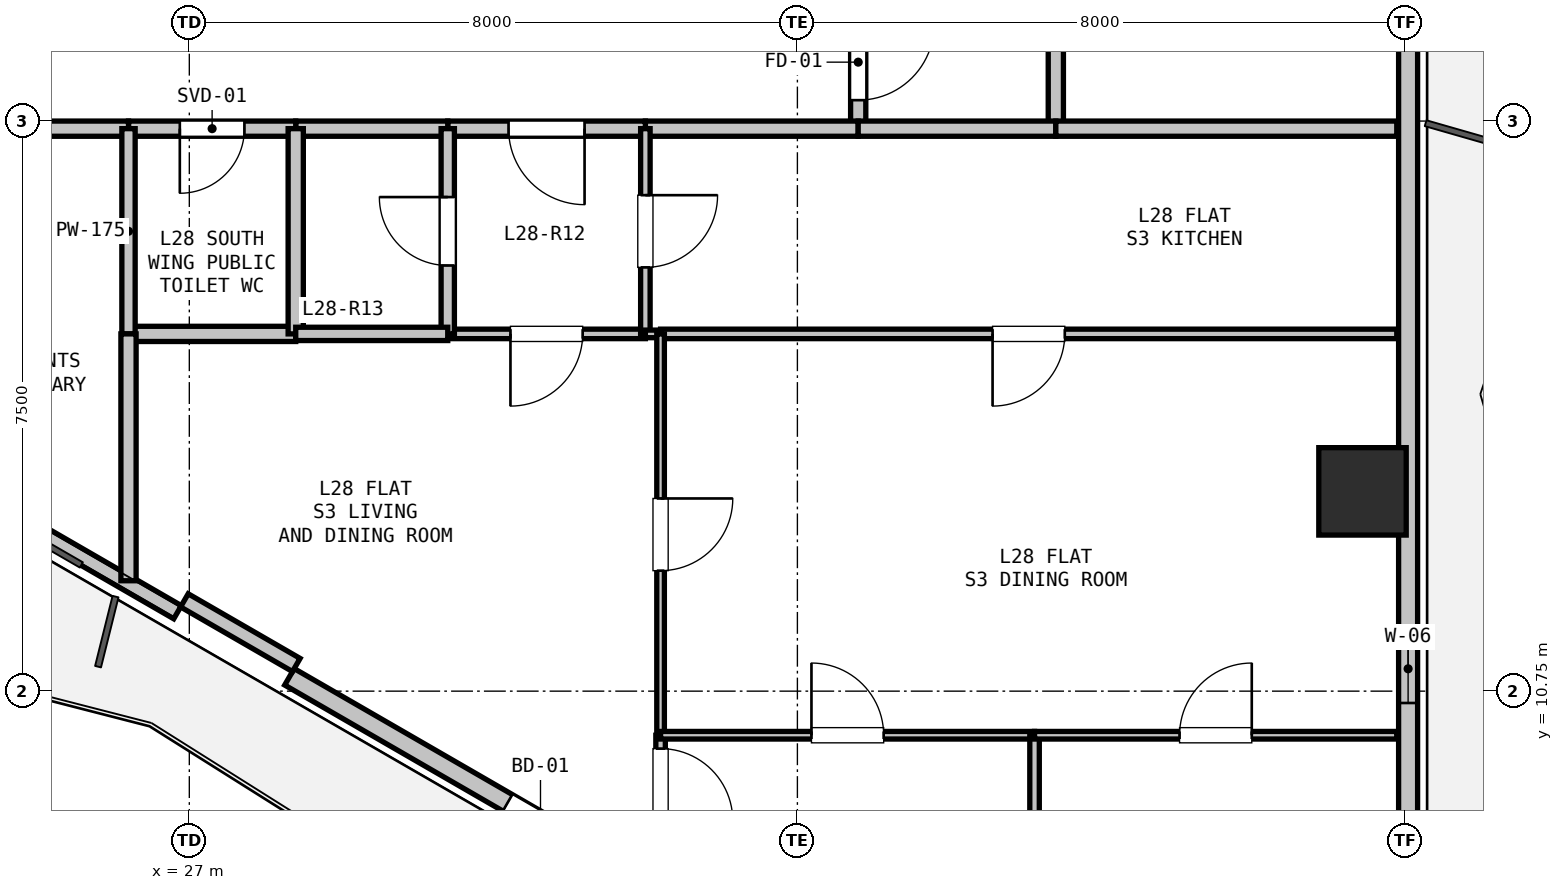
"""IFC4 building model, lengths in metres.
Left out: names, types, materials, properties, quantities, classifications, styles, units other than length and angle.
Written with IfcOpenShell. Run it as: python <this file> out.ifc"""

import sys

from ifc_helpers import new_model, si_unit, direction, frame, frame_2d, origin, origin_2d, place, context, subcontext, project, spatial, rectangle, hollow_rectangle, extrude, element, fill, save


model = new_model("IFC4")
c1 = context("Model", 3, precision=1e-05, world=origin(), true_north=direction((0.0, 1.0)))
c2 = subcontext(c1, "Body", "Model", "MODEL_VIEW")
j1 = project(units=[si_unit("LENGTHUNIT", "METRE"), si_unit("PLANEANGLEUNIT", "RADIAN")], contexts=[c1])
p1 = place(None, origin())
s1 = spatial("IfcSite", under=j1, at=p1, CompositionType="ELEMENT")
p2 = place(p1, origin())
s2 = spatial("IfcBuilding", under=s1, at=p2, CompositionType="ELEMENT")
p3 = place(p2, frame((0.0, 0.0, 103.2)))
s3 = spatial("IfcBuildingStorey", under=s2, at=p3, CompositionType="ELEMENT", Elevation=103.2)
p4 = place(p3, frame((42.435, 13.378, 0.0), z_axis=(0.0, 0.0, 1.0), x_axis=(1.0, 0.0, 0.0)))
e1 = element("IfcColumn", 1, at=p4, inside=s3, PredefinedType="COLUMN", context=c2, shape_type="SweptSolid", body=[
    extrude(hollow_rectangle(XDim=1.15, YDim=1.15, WallThickness=0.032, at=origin_2d()), origin(), (0.0, 0.0, 1.0), 3.3),
])
p5 = place(p3, frame((43.035, 19.435, 0.0), z_axis=(0.0, 0.0, 1.0), x_axis=(0.0, -1.0, 0.0)))
e2 = element("IfcWall", 2, at=p5, inside=s3, PredefinedType="SOLIDWALL", context=c2, shape_type="SweptSolid", body=[
    extrude(rectangle(XDim=11.93, YDim=0.25, at=frame_2d((5.965, 0.0))), origin(), (0.0, 0.0, 1.0), 2.67),
])
p6 = place(p5, frame((7.941, 0.0, 0.9)))
e3 = element("IfcOpeningElement", 3, at=p6, cuts=e2, PredefinedType="OPENING", context=c2, shape_type="SweptSolid", body=[
    extrude(rectangle(XDim=0.9, YDim=1.4, at=frame_2d((0.45, 0.7))), frame((0.0, 0.135, 0.0), z_axis=(0.0, -1.0, 0.0), x_axis=(1.0, 0.0, 0.0)), (0.0, 0.0, 1.0), 0.27),
])
p7 = place(p3, frame((38.649, 4.973, 0.0), z_axis=(0.0, 0.0, 1.0), x_axis=(-0.866023023012, 0.500004123596, 0.0)))
e4 = element("IfcWall", 4, at=p7, inside=s3, PredefinedType="SOLIDWALL", context=c2, shape_type="SweptSolid", body=[
    extrude(rectangle(XDim=11.93, YDim=0.25, at=frame_2d((5.965, 0.0))), origin(), (0.0, 0.0, 1.0), 2.67),
])
p8 = place(p7, frame((7.616, 0.0, 0.0)))
e5 = element("IfcOpeningElement", 5, at=p8, cuts=e4, PredefinedType="OPENING", context=c2, shape_type="SweptSolid", body=[
    extrude(rectangle(XDim=1.0, YDim=2.1, at=frame_2d((0.5, 1.05))), frame((0.0, 0.135, 0.0), z_axis=(0.0, -1.0, 0.0), x_axis=(1.0, 0.0, 0.0)), (0.0, 0.0, 1.0), 0.27),
])
p9 = place(p7, frame((3.059, 0.0, 0.9)))
e6 = element("IfcOpeningElement", 6, at=p9, cuts=e4, PredefinedType="OPENING", context=c2, shape_type="SweptSolid", body=[
    extrude(rectangle(XDim=1.2, YDim=1.4, at=frame_2d((0.6, 0.7))), frame((0.0, 0.135, 0.0), z_axis=(0.0, -1.0, 0.0), x_axis=(1.0, 0.0, 0.0)), (0.0, 0.0, 1.0), 0.27),
])
p10 = place(p3, frame((26.845, 11.788, 0.0), z_axis=(0.0, 0.0, 1.0), x_axis=(-0.866027010039, 0.499997217876, 0.0)))
e7 = element("IfcWall", 7, at=p10, inside=s3, PredefinedType="PARAPET", context=c2, shape_type="SweptSolid", body=[
    extrude(rectangle(XDim=11.229, YDim=0.2, at=frame_2d((5.615, 0.0))), origin(), (0.0, 0.0, 1.0), 0.2),
])
p11 = place(p3, frame((28.407, 11.094, 0.0), z_axis=(0.0, 0.0, 1.0), x_axis=(-0.86605165483, 0.499954529098, 0.0)))
e8 = element("IfcWall", 8, at=p11, inside=s3, PredefinedType="PARAPET", context=c2, shape_type="SweptSolid", body=[
    extrude(rectangle(XDim=1.7, YDim=0.2, at=frame_2d((0.85, 0.0))), origin(), (0.0, 0.0, 1.0), 2.67),
])
p12 = place(p3, frame((35.8, 19.9, 0.0), z_axis=(0.0, 0.0, 1.0), x_axis=(0.0, -1.0, 0.0)))
e9 = element("IfcWall", 9, at=p12, inside=s3, PredefinedType="PARTITIONING", context=c2, shape_type="SweptSolid", body=[
    extrude(rectangle(XDim=1.75, YDim=0.2, at=frame_2d((0.875, 0.0))), origin(), (0.0, 0.0, 1.0), 3.05),
])
p13 = place(p12, frame((0.375, 0.0, 0.0)))
e10 = element("IfcOpeningElement", 10, at=p13, cuts=e9, PredefinedType="OPENING", context=c2, shape_type="SweptSolid", body=[
    extrude(rectangle(XDim=1.0, YDim=2.15, at=frame_2d((0.5, 1.075))), frame((0.0, 0.11, 0.0), z_axis=(0.0, -1.0, 0.0), x_axis=(1.0, 0.0, 0.0)), (0.0, 0.0, 1.0), 0.22),
])
p14 = place(p3, frame((35.8, 18.15, 0.0), z_axis=(0.0, 0.0, 1.0), x_axis=(-1.0, 0.0, 0.0)))
e11 = element("IfcWall", 11, at=p14, inside=s3, PredefinedType="PARTITIONING", context=c2, shape_type="SweptSolid", body=[
    extrude(rectangle(XDim=2.8, YDim=0.2, at=frame_2d((1.4, 0.0))), origin(), (0.0, 0.0, 1.0), 3.05),
])
p15 = place(p3, frame((33.0, 18.15, 0.0), z_axis=(0.0, 0.0, 1.0), x_axis=(-1.0, 0.0, 0.0)))
e12 = element("IfcWall", 12, at=p15, inside=s3, PredefinedType="PARTITIONING", context=c2, shape_type="SweptSolid", body=[
    extrude(rectangle(XDim=2.6, YDim=0.2, at=frame_2d((1.3, 0.0))), origin(), (0.0, 0.0, 1.0), 3.05),
])
p16 = place(p15, frame((0.8, 0.0, 0.0)))
e13 = element("IfcOpeningElement", 13, at=p16, cuts=e12, PredefinedType="OPENING", context=c2, shape_type="SweptSolid", body=[
    extrude(rectangle(XDim=1.0, YDim=2.15, at=frame_2d((0.5, 1.075))), frame((0.0, 0.11, 0.0), z_axis=(0.0, -1.0, 0.0), x_axis=(1.0, 0.0, 0.0)), (0.0, 0.0, 1.0), 0.22),
])
p17 = place(p3, frame((30.4, 18.15, 0.0), z_axis=(0.0, 0.0, 1.0), x_axis=(-1.0, 0.0, 0.0)))
e14 = element("IfcWall", 14, at=p17, inside=s3, PredefinedType="PARTITIONING", context=c2, shape_type="SweptSolid", body=[
    extrude(rectangle(XDim=2.0, YDim=0.2, at=frame_2d((1.0, 0.0))), origin(), (0.0, 0.0, 1.0), 3.05),
])
p18 = place(p3, frame((28.4, 18.15, 0.0), z_axis=(0.0, 0.0, 1.0), x_axis=(-1.0, 0.0, 0.0)))
e15 = element("IfcWall", 15, at=p18, inside=s3, PredefinedType="PARTITIONING", context=c2, shape_type="SweptSolid", body=[
    extrude(rectangle(XDim=2.2, YDim=0.2, at=frame_2d((1.1, 0.0))), origin(), (0.0, 0.0, 1.0), 3.05),
])
p19 = place(p18, frame((0.675, 0.0, 0.0)))
e16 = element("IfcOpeningElement", 16, at=p19, cuts=e15, PredefinedType="OPENING", context=c2, shape_type="SweptSolid", body=[
    extrude(rectangle(XDim=0.85, YDim=2.1, at=frame_2d((0.425, 1.05))), frame((0.0, 0.11, 0.0), z_axis=(0.0, -1.0, 0.0), x_axis=(1.0, 0.0, 0.0)), (0.0, 0.0, 1.0), 0.22),
])
p20 = place(p3, frame((26.2, 18.15, 0.0), z_axis=(0.0, 0.0, 1.0), x_axis=(-1.0, 0.0, 0.0)))
e17 = element("IfcWall", 17, at=p20, inside=s3, PredefinedType="PARTITIONING", context=c2, shape_type="SweptSolid", body=[
    extrude(rectangle(XDim=6.6, YDim=0.2, at=frame_2d((3.3, 0.0))), origin(), (0.0, 0.0, 1.0), 2.423),
])
p21 = place(p20, frame((2.4, 0.0, 0.0)))
e18 = element("IfcOpeningElement", 18, at=p21, cuts=e17, PredefinedType="OPENING", context=c2, shape_type="SweptSolid", body=[
    extrude(rectangle(XDim=1.8, YDim=2.2, at=frame_2d((0.9, 1.1))), frame((0.0, 0.11, 0.0), z_axis=(0.0, -1.0, 0.0), x_axis=(1.0, 0.0, 0.0)), (0.0, 0.0, 1.0), 0.22),
])
p22 = place(p3, frame((38.4, 21.4, 0.0), z_axis=(0.0, 0.0, 1.0), x_axis=(0.0, -1.0, 0.0)))
e19 = element("IfcWall", 19, at=p22, inside=s3, PredefinedType="PARTITIONING", context=c2, shape_type="SweptSolid", body=[
    extrude(rectangle(XDim=3.25, YDim=0.2, at=frame_2d((1.625, 0.0))), origin(), (0.0, 0.0, 1.0), 3.05),
])
p23 = place(p3, frame((38.4, 18.15, 0.0), z_axis=(0.0, 0.0, 1.0), x_axis=(-1.0, 0.0, 0.0)))
e20 = element("IfcWall", 20, at=p23, inside=s3, PredefinedType="PARTITIONING", context=c2, shape_type="SweptSolid", body=[
    extrude(rectangle(XDim=2.6, YDim=0.2, at=frame_2d((1.3, 0.0))), origin(), (0.0, 0.0, 1.0), 2.423),
])
p24 = place(p3, frame((33.0, 15.45, 0.0), z_axis=(0.0, 0.0, 1.0), x_axis=(-1.0, 0.0, 0.0)))
e21 = element("IfcWall", 21, at=p24, inside=s3, PredefinedType="PARTITIONING", context=c2, shape_type="SweptSolid", body=[
    extrude(rectangle(XDim=2.6, YDim=0.125, at=frame_2d((1.3, 0.0))), origin(), (0.0, 0.0, 1.0), 3.05),
])
p25 = place(p24, frame((0.825, 0.0, 0.0)))
e22 = element("IfcOpeningElement", 22, at=p25, cuts=e21, PredefinedType="OPENING", context=c2, shape_type="SweptSolid", body=[
    extrude(rectangle(XDim=0.95, YDim=2.1, at=frame_2d((0.475, 1.05))), frame((0.0, 0.073, 0.0), z_axis=(0.0, -1.0, 0.0), x_axis=(1.0, 0.0, 0.0)), (0.0, 0.0, 1.0), 0.145),
])
p26 = place(p3, frame((30.4, 15.45, 0.0), z_axis=(0.0, 0.0, 1.0), x_axis=(0.0, 1.0, 0.0)))
e23 = element("IfcWall", 23, at=p26, inside=s3, PredefinedType="PLUMBINGWALL", context=c2, shape_type="SweptSolid", body=[
    extrude(rectangle(XDim=2.7, YDim=0.175, at=frame_2d((1.35, 0.0))), origin(), (0.0, 0.0, 1.0), 3.05),
])
p27 = place(p26, frame((0.9, 0.0, 0.0)))
e24 = element("IfcOpeningElement", 24, at=p27, cuts=e23, PredefinedType="OPENING", context=c2, shape_type="SweptSolid", body=[
    extrude(rectangle(XDim=0.9, YDim=2.1, at=frame_2d((0.45, 1.05))), frame((0.0, 0.097, 0.0), z_axis=(0.0, -1.0, 0.0), x_axis=(1.0, 0.0, 0.0)), (0.0, 0.0, 1.0), 0.195),
])
p28 = place(p3, frame((33.0, 18.15, 0.0), z_axis=(0.0, 0.0, 1.0), x_axis=(0.0, -1.0, 0.0)))
e25 = element("IfcWall", 25, at=p28, inside=s3, PredefinedType="PARTITIONING", context=c2, shape_type="SweptSolid", body=[
    extrude(rectangle(XDim=2.7, YDim=0.125, at=frame_2d((1.35, 0.0))), origin(), (0.0, 0.0, 1.0), 3.05),
])
p29 = place(p28, frame((0.875, 0.0, 0.0)))
e26 = element("IfcOpeningElement", 26, at=p29, cuts=e25, PredefinedType="OPENING", context=c2, shape_type="SweptSolid", body=[
    extrude(rectangle(XDim=0.95, YDim=2.1, at=frame_2d((0.475, 1.05))), frame((0.0, 0.073, 0.0), z_axis=(0.0, -1.0, 0.0), x_axis=(1.0, 0.0, 0.0)), (0.0, 0.0, 1.0), 0.145),
])
p30 = place(p3, frame((28.4, 15.45, 0.0), z_axis=(0.0, 0.0, 1.0), x_axis=(-1.0, 0.0, 0.0)))
e27 = element("IfcWall", 27, at=p30, inside=s3, PredefinedType="PARTITIONING", context=c2, shape_type="SweptSolid", body=[
    extrude(rectangle(XDim=2.2, YDim=0.2, at=frame_2d((1.1, 0.0))), origin(), (0.0, 0.0, 1.0), 2.423),
])
p31 = place(p3, frame((26.2, 15.45, 0.0), z_axis=(0.0, 0.0, 1.0), x_axis=(0.0, 1.0, 0.0)))
e28 = element("IfcWall", 28, at=p31, inside=s3, PredefinedType="PLUMBINGWALL", context=c2, shape_type="SweptSolid", body=[
    extrude(rectangle(XDim=2.7, YDim=0.175, at=frame_2d((1.35, 0.0))), origin(), (0.0, 0.0, 1.0), 2.423),
])
p32 = place(p3, frame((28.4, 18.15, 0.0), z_axis=(0.0, 0.0, 1.0), x_axis=(0.0, -1.0, 0.0)))
e29 = element("IfcWall", 29, at=p32, inside=s3, PredefinedType="PARTITIONING", context=c2, shape_type="SweptSolid", body=[
    extrude(rectangle(XDim=2.7, YDim=0.2, at=frame_2d((1.35, 0.0))), origin(), (0.0, 0.0, 1.0), 3.05),
])
p33 = place(p3, frame((30.4, 15.45, 0.0), z_axis=(0.0, 0.0, 1.0), x_axis=(-1.0, 0.0, 0.0)))
e30 = element("IfcWall", 30, at=p33, inside=s3, PredefinedType="PLUMBINGWALL", context=c2, shape_type="SweptSolid", body=[
    extrude(rectangle(XDim=2.0, YDim=0.175, at=frame_2d((1.0, 0.0))), origin(), (0.0, 0.0, 1.0), 3.05),
])
p34 = place(p3, frame((38.4, 18.15, 0.0), z_axis=(0.0, 0.0, 1.0), x_axis=(1.0, 0.0, 0.0)))
e31 = element("IfcWall", 31, at=p34, inside=s3, PredefinedType="PARTITIONING", context=c2, shape_type="SweptSolid", body=[
    extrude(rectangle(XDim=4.486, YDim=0.2, at=frame_2d((2.243, 0.0))), origin(), (0.0, 0.0, 1.0), 2.365),
])
p35 = place(p3, frame((42.885, 15.45, 0.0), z_axis=(0.0, 0.0, 1.0), x_axis=(-1.0, 0.0, 0.0)))
e32 = element("IfcWall", 32, at=p35, inside=s3, PredefinedType="PARTITIONING", context=c2, shape_type="SweptSolid", body=[
    extrude(rectangle(XDim=9.686, YDim=0.125, at=frame_2d((4.843, 0.0))), origin(), (0.0, 0.0, 1.0), 2.365),
])
p36 = place(p35, frame((4.368, 0.0, 0.0)))
e33 = element("IfcOpeningElement", 33, at=p36, cuts=e32, PredefinedType="OPENING", context=c2, shape_type="SweptSolid", body=[
    extrude(rectangle(XDim=0.95, YDim=2.1, at=frame_2d((0.475, 1.05))), frame((0.0, 0.073, 0.0), z_axis=(0.0, -1.0, 0.0), x_axis=(1.0, 0.0, 0.0)), (0.0, 0.0, 1.0), 0.145),
])
p37 = place(p3, frame((33.2, 15.45, 0.0), z_axis=(0.0, 0.0, 1.0), x_axis=(-1.0, 0.0, 0.0)))
e34 = element("IfcWall", 34, at=p37, inside=s3, PredefinedType="PARTITIONING", context=c2, shape_type="SweptSolid", body=[
    extrude(rectangle(XDim=0.2, YDim=0.1, at=frame_2d((0.1, 0.0))), origin(), (0.0, 0.0, 1.0), 3.05),
])
p38 = place(p3, frame((26.2, 15.45, 0.0), z_axis=(0.0, 0.0, 1.0), x_axis=(0.0, -1.0, 0.0)))
e35 = element("IfcWall", 35, at=p38, inside=s3, PredefinedType="PARTITIONING", context=c2, shape_type="SweptSolid", body=[
    extrude(rectangle(XDim=3.248, YDim=0.2, at=frame_2d((1.624, 0.0))), origin(), (0.0, 0.0, 1.0), 2.365),
])
p39 = place(p3, frame((33.2, 15.45, 0.0), z_axis=(0.0, 0.0, 1.0), x_axis=(0.0, -1.0, 0.0)))
e36 = element("IfcWall", 36, at=p39, inside=s3, PredefinedType="PARTITIONING", context=c2, shape_type="SweptSolid", body=[
    extrude(rectangle(XDim=5.28, YDim=0.1, at=frame_2d((2.64, 0.0))), origin(), (0.0, 0.0, 1.0), 3.05),
])
p40 = place(p39, frame((2.165, 0.0, 0.0)))
e37 = element("IfcOpeningElement", 37, at=p40, cuts=e36, PredefinedType="OPENING", context=c2, shape_type="SweptSolid", body=[
    extrude(rectangle(XDim=0.95, YDim=2.1, at=frame_2d((0.475, 1.05))), frame((0.0, 0.06, 0.0), z_axis=(0.0, -1.0, 0.0), x_axis=(1.0, 0.0, 0.0)), (0.0, 0.0, 1.0), 0.12),
])
p41 = place(p3, frame((33.2, 10.17, 0.0), z_axis=(0.0, 0.0, 1.0), x_axis=(0.0, -1.0, 0.0)))
e38 = element("IfcWall", 38, at=p41, inside=s3, PredefinedType="PARTITIONING", context=c2, shape_type="SweptSolid", body=[
    extrude(rectangle(XDim=1.878, YDim=0.125, at=frame_2d((0.939, 0.0))), origin(), (0.0, 0.0, 1.0), 2.365),
])
p42 = place(p41, frame((0.176, 0.0, 0.0)))
e39 = element("IfcOpeningElement", 39, at=p42, cuts=e38, PredefinedType="OPENING", context=c2, shape_type="SweptSolid", body=[
    extrude(rectangle(XDim=0.95, YDim=2.1, at=frame_2d((0.475, 1.05))), frame((0.0, 0.073, 0.0), z_axis=(0.0, -1.0, 0.0), x_axis=(1.0, 0.0, 0.0)), (0.0, 0.0, 1.0), 0.145),
])
p43 = place(p3, frame((33.2, 10.17, 0.0), z_axis=(0.0, 0.0, 1.0), x_axis=(1.0, 0.0, 0.0)))
e40 = element("IfcWall", 40, at=p43, inside=s3, PredefinedType="PARTITIONING", context=c2, shape_type="SweptSolid", body=[
    extrude(rectangle(XDim=4.92, YDim=0.1, at=frame_2d((2.46, 0.0))), origin(), (0.0, 0.0, 1.0), 3.05),
])
p44 = place(p43, frame((1.985, 0.0, 0.0)))
e41 = element("IfcOpeningElement", 41, at=p44, cuts=e40, PredefinedType="OPENING", context=c2, shape_type="SweptSolid", body=[
    extrude(rectangle(XDim=0.95, YDim=2.1, at=frame_2d((0.475, 1.05))), frame((0.0, 0.06, 0.0), z_axis=(0.0, -1.0, 0.0), x_axis=(1.0, 0.0, 0.0)), (0.0, 0.0, 1.0), 0.12),
])
p45 = place(p3, frame((38.12, 10.17, 0.0), z_axis=(0.0, 0.0, 1.0), x_axis=(0.0, -1.0, 0.0)))
e42 = element("IfcWall", 42, at=p45, inside=s3, PredefinedType="PARTITIONING", context=c2, shape_type="SweptSolid", body=[
    extrude(rectangle(XDim=4.719, YDim=0.125, at=frame_2d((2.359, 0.0))), origin(), (0.0, 0.0, 1.0), 2.715),
])
p46 = place(p45, frame((1.885, 0.0, 0.0)))
e43 = element("IfcOpeningElement", 43, at=p46, cuts=e42, PredefinedType="OPENING", context=c2, shape_type="SweptSolid", body=[
    extrude(rectangle(XDim=0.95, YDim=2.1, at=frame_2d((0.475, 1.05))), frame((0.0, 0.073, 0.0), z_axis=(0.0, -1.0, 0.0), x_axis=(1.0, 0.0, 0.0)), (0.0, 0.0, 1.0), 0.145),
])
p47 = place(p3, frame((38.12, 10.17, 0.0), z_axis=(0.0, 0.0, 1.0), x_axis=(1.0, 0.0, 0.0)))
e44 = element("IfcWall", 44, at=p47, inside=s3, PredefinedType="PARTITIONING", context=c2, shape_type="SweptSolid", body=[
    extrude(rectangle(XDim=4.765, YDim=0.1, at=frame_2d((2.383, 0.0))), origin(), (0.0, 0.0, 1.0), 2.423),
])
p48 = place(p47, frame((1.908, 0.0, 0.0)))
e45 = element("IfcOpeningElement", 45, at=p48, cuts=e44, PredefinedType="OPENING", context=c2, shape_type="SweptSolid", body=[
    extrude(rectangle(XDim=0.95, YDim=2.1, at=frame_2d((0.475, 1.05))), frame((0.0, 0.06, 0.0), z_axis=(0.0, -1.0, 0.0), x_axis=(1.0, 0.0, 0.0)), (0.0, 0.0, 1.0), 0.12),
])
p49 = place(p6, origin())
e46 = element("IfcWindow", 46, at=p49, inside=s3, PartitioningType="SINGLE_PANEL", PredefinedType="WINDOW", context=c2, shape_type="SweptSolid", body=[
    extrude(rectangle(XDim=0.9, YDim=1.4, at=frame_2d((0.45, 0.7))), frame((0.0, 0.03, 0.0), z_axis=(0.0, -1.0, 0.0), x_axis=(1.0, 0.0, 0.0)), (0.0, 0.0, 1.0), 0.06),
])
fill(e3, e46)
p50 = place(p8, origin())
e47 = element("IfcDoor", 47, at=p50, inside=s3, OperationType="SINGLE_SWING_LEFT", PredefinedType="DOOR", context=c2, shape_type="SweptSolid", body=[
    extrude(rectangle(XDim=1.0, YDim=2.1, at=frame_2d((0.5, 1.05))), frame((0.0, 0.025, 0.0), z_axis=(0.0, -1.0, 0.0), x_axis=(1.0, 0.0, 0.0)), (0.0, 0.0, 1.0), 0.05),
])
fill(e5, e47)
p51 = place(p13, origin())
e48 = element("IfcDoor", 48, at=p51, inside=s3, OperationType="SINGLE_SWING_LEFT", PredefinedType="DOOR", context=c2, shape_type="SweptSolid", body=[
    extrude(rectangle(XDim=1.0, YDim=2.15, at=frame_2d((0.5, 1.075))), frame((0.0, 0.025, 0.0), z_axis=(0.0, -1.0, 0.0), x_axis=(1.0, 0.0, 0.0)), (0.0, 0.0, 1.0), 0.05),
])
fill(e10, e48)
p52 = place(p16, origin())
e49 = element("IfcDoor", 49, at=p52, inside=s3, OperationType="SINGLE_SWING_LEFT", PredefinedType="DOOR", context=c2, shape_type="SweptSolid", body=[
    extrude(rectangle(XDim=1.0, YDim=2.15, at=frame_2d((0.5, 1.075))), frame((0.0, 0.025, 0.0), z_axis=(0.0, -1.0, 0.0), x_axis=(1.0, 0.0, 0.0)), (0.0, 0.0, 1.0), 0.05),
])
fill(e13, e49)
p53 = place(p19, origin())
e50 = element("IfcDoor", 50, at=p53, inside=s3, OperationType="SINGLE_SWING_RIGHT", PredefinedType="DOOR", context=c2, shape_type="SweptSolid", body=[
    extrude(rectangle(XDim=0.85, YDim=2.1, at=frame_2d((0.425, 1.05))), frame((0.0, 0.025, 0.0), z_axis=(0.0, -1.0, 0.0), x_axis=(1.0, 0.0, 0.0)), (0.0, 0.0, 1.0), 0.05),
])
fill(e16, e50)
p54 = place(p27, origin())
e51 = element("IfcDoor", 51, at=p54, inside=s3, OperationType="SINGLE_SWING_RIGHT", PredefinedType="DOOR", context=c2, shape_type="SweptSolid", body=[
    extrude(rectangle(XDim=0.9, YDim=2.1, at=frame_2d((0.45, 1.05))), frame((0.0, 0.025, 0.0), z_axis=(0.0, -1.0, 0.0), x_axis=(1.0, 0.0, 0.0)), (0.0, 0.0, 1.0), 0.05),
])
fill(e24, e51)
p55 = place(p29, origin())
e52 = element("IfcDoor", 52, at=p55, inside=s3, OperationType="SINGLE_SWING_LEFT", PredefinedType="DOOR", context=c2, shape_type="SweptSolid", body=[
    extrude(rectangle(XDim=0.95, YDim=2.1, at=frame_2d((0.475, 1.05))), frame((0.0, 0.025, 0.0), z_axis=(0.0, -1.0, 0.0), x_axis=(1.0, 0.0, 0.0)), (0.0, 0.0, 1.0), 0.05),
])
fill(e26, e52)
p56 = place(p25, origin())
e53 = element("IfcDoor", 53, at=p56, inside=s3, OperationType="SINGLE_SWING_RIGHT", PredefinedType="DOOR", context=c2, shape_type="SweptSolid", body=[
    extrude(rectangle(XDim=0.95, YDim=2.1, at=frame_2d((0.475, 1.05))), frame((0.0, 0.025, 0.0), z_axis=(0.0, -1.0, 0.0), x_axis=(1.0, 0.0, 0.0)), (0.0, 0.0, 1.0), 0.05),
])
fill(e22, e53)
p57 = place(p36, origin())
e54 = element("IfcDoor", 54, at=p57, inside=s3, OperationType="SINGLE_SWING_RIGHT", PredefinedType="DOOR", context=c2, shape_type="SweptSolid", body=[
    extrude(rectangle(XDim=0.95, YDim=2.1, at=frame_2d((0.475, 1.05))), frame((0.0, 0.025, 0.0), z_axis=(0.0, -1.0, 0.0), x_axis=(1.0, 0.0, 0.0)), (0.0, 0.0, 1.0), 0.05),
])
fill(e33, e54)
p58 = place(p42, origin())
e55 = element("IfcDoor", 55, at=p58, inside=s3, OperationType="SINGLE_SWING_RIGHT", PredefinedType="DOOR", context=c2, shape_type="SweptSolid", body=[
    extrude(rectangle(XDim=0.95, YDim=2.1, at=frame_2d((0.475, 1.05))), frame((0.0, 0.025, 0.0), z_axis=(0.0, -1.0, 0.0), x_axis=(1.0, 0.0, 0.0)), (0.0, 0.0, 1.0), 0.05),
])
fill(e39, e55)
p59 = place(p40, origin())
e56 = element("IfcDoor", 56, at=p59, inside=s3, OperationType="SINGLE_SWING_LEFT", PredefinedType="DOOR", context=c2, shape_type="SweptSolid", body=[
    extrude(rectangle(XDim=0.95, YDim=2.1, at=frame_2d((0.475, 1.05))), frame((0.0, 0.025, 0.0), z_axis=(0.0, -1.0, 0.0), x_axis=(1.0, 0.0, 0.0)), (0.0, 0.0, 1.0), 0.05),
])
fill(e37, e56)
p60 = place(p44, origin())
e57 = element("IfcDoor", 57, at=p60, inside=s3, OperationType="SINGLE_SWING_LEFT", PredefinedType="DOOR", context=c2, shape_type="SweptSolid", body=[
    extrude(rectangle(XDim=0.95, YDim=2.1, at=frame_2d((0.475, 1.05))), frame((0.0, 0.025, 0.0), z_axis=(0.0, -1.0, 0.0), x_axis=(1.0, 0.0, 0.0)), (0.0, 0.0, 1.0), 0.05),
])
fill(e41, e57)
p61 = place(p48, origin())
e58 = element("IfcDoor", 58, at=p61, inside=s3, OperationType="SINGLE_SWING_RIGHT", PredefinedType="DOOR", context=c2, shape_type="SweptSolid", body=[
    extrude(rectangle(XDim=0.95, YDim=2.1, at=frame_2d((0.475, 1.05))), frame((0.0, 0.025, 0.0), z_axis=(0.0, -1.0, 0.0), x_axis=(1.0, 0.0, 0.0)), (0.0, 0.0, 1.0), 0.05),
])
fill(e45, e58)
save(model, sys.argv[1])
